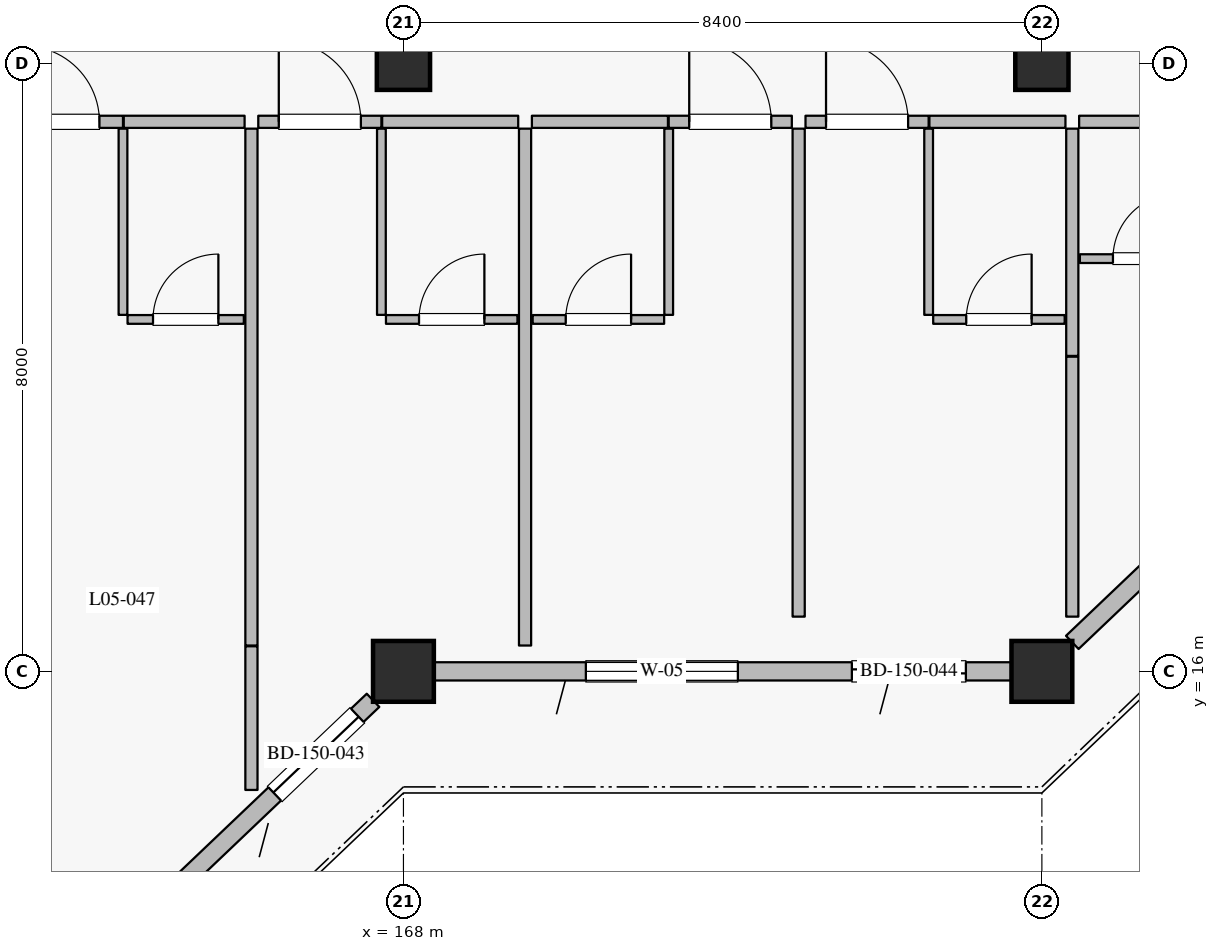
"""IFC4 building model, lengths in metres.
Left out: names, types, materials, properties, quantities, classifications, styles, units other than length and angle.
Written with IfcOpenShell. Run it as: python <this file> out.ifc"""

import sys

from ifc_helpers import new_model, si_unit, direction, frame, frame_2d, origin, origin_2d, place, context, subcontext, project, spatial, rectangle, extrude, element, fill, save


model = new_model("IFC4")
c1 = context("Model", 3, precision=1e-05, world=origin(), true_north=direction((0.0, 1.0)))
c2 = subcontext(c1, "Body", "Model", "MODEL_VIEW")
j1 = project(units=[si_unit("LENGTHUNIT", "METRE"), si_unit("PLANEANGLEUNIT", "RADIAN")], contexts=[c1])
p1 = place(None, origin())
s1 = spatial("IfcSite", under=j1, at=p1, CompositionType="ELEMENT")
p2 = place(p1, origin())
s2 = spatial("IfcBuilding", under=s1, at=p2, CompositionType="ELEMENT")
p3 = place(p2, frame((0.0, 0.0, 25.2)))
s3 = spatial("IfcBuildingStorey", under=s2, at=p3, CompositionType="ELEMENT", Elevation=25.2)
for number, where, z_axis, x_axis in (
    (1, (168.0, 16.0, 0.0), (0.0, 0.0, 1.0), (1.0, 0.0, 0.0)),
    (2, (176.4, 16.0, 0.0), (0.0, 0.0, 1.0), (1.0, 0.0, 0.0)),
):
    element("IfcColumn", number, at=place(p3, frame(where, z_axis=z_axis, x_axis=x_axis)), inside=s3, PredefinedType="COLUMN", context=c2, shape_type="SweptSolid", body=[
        extrude(rectangle(XDim=0.8, YDim=0.8, at=origin_2d()), origin(), (0.0, 0.0, 1.0), 3.6),
    ])
for number, where, z_axis, x_axis in (
    (3, (168.0, 24.0, 0.0), (0.0, 0.0, 1.0), (1.0, 0.0, 0.0)),
    (4, (176.4, 24.0, 0.0), (0.0, 0.0, 1.0), (1.0, 0.0, 0.0)),
):
    element("IfcColumn", number, at=place(p3, frame(where, z_axis=z_axis, x_axis=x_axis)), inside=s3, PredefinedType="COLUMN", context=c2, shape_type="SweptSolid", body=[
        extrude(rectangle(XDim=0.7, YDim=0.7, at=origin_2d()), origin(), (0.0, 0.0, 1.0), 3.6),
    ])
p4 = place(p3, frame((167.6, 15.619, 0.0), z_axis=(0.0, 0.0, 1.0), x_axis=(-0.724156739794, -0.689635422677, 0.0)))
e5 = element("IfcWall", 5, at=p4, inside=s3, PredefinedType="SOLIDWALL", context=c2, shape_type="SweptSolid", body=[
    extrude(rectangle(XDim=10.495, YDim=0.24, at=frame_2d((5.248, 0.0))), origin(), (0.0, 0.0, 1.0), 2.93),
])
p5 = place(p4, frame((0.286, 0.0, 0.0)))
e6 = element("IfcOpeningElement", 6, at=p5, cuts=e5, PredefinedType="OPENING", context=c2, shape_type="SweptSolid", body=[
    extrude(rectangle(XDim=1.5, YDim=2.25, at=frame_2d((0.75, 1.125))), frame((0.0, 0.13, 0.0), z_axis=(0.0, -1.0, 0.0), x_axis=(1.0, 0.0, 0.0)), (0.0, 0.0, 1.0), 0.26),
])
p6 = place(p4, frame((3.757, 0.0, 0.8)))
e7 = element("IfcOpeningElement", 7, at=p6, cuts=e5, PredefinedType="OPENING", context=c2, shape_type="SweptSolid", body=[
    extrude(rectangle(XDim=1.6, YDim=1.6, at=frame_2d((0.8, 0.8))), frame((0.0, 0.13, 0.0), z_axis=(0.0, -1.0, 0.0), x_axis=(1.0, 0.0, 0.0)), (0.0, 0.0, 1.0), 0.26),
])
p7 = place(p4, frame((7.969, 0.0, 0.8)))
e8 = element("IfcOpeningElement", 8, at=p7, cuts=e5, PredefinedType="OPENING", context=c2, shape_type="SweptSolid", body=[
    extrude(rectangle(XDim=1.6, YDim=1.6, at=frame_2d((0.8, 0.8))), frame((0.0, 0.13, 0.0), z_axis=(0.0, -1.0, 0.0), x_axis=(1.0, 0.0, 0.0)), (0.0, 0.0, 1.0), 0.26),
])
p8 = place(p3, frame((176.0, 16.0, 0.0), z_axis=(0.0, 0.0, 1.0), x_axis=(-1.0, 0.0, 0.0)))
e9 = element("IfcWall", 9, at=p8, inside=s3, PredefinedType="SOLIDWALL", context=c2, shape_type="SweptSolid", body=[
    extrude(rectangle(XDim=7.6, YDim=0.24, at=frame_2d((3.8, 0.0))), origin(), (0.0, 0.0, 1.0), 2.89),
])
p9 = place(p8, frame((0.6, 0.0, 0.0)))
e10 = element("IfcOpeningElement", 10, at=p9, cuts=e9, PredefinedType="OPENING", context=c2, shape_type="SweptSolid", body=[
    extrude(rectangle(XDim=1.5, YDim=2.25, at=frame_2d((0.75, 1.125))), frame((0.0, 0.13, 0.0), z_axis=(0.0, -1.0, 0.0), x_axis=(1.0, 0.0, 0.0)), (0.0, 0.0, 1.0), 0.26),
])
p10 = place(p8, frame((3.6, 0.0, 0.8)))
e11 = element("IfcOpeningElement", 11, at=p10, cuts=e9, PredefinedType="OPENING", context=c2, shape_type="SweptSolid", body=[
    extrude(rectangle(XDim=2.0, YDim=1.75, at=frame_2d((1.0, 0.875))), frame((0.0, 0.13, 0.0), z_axis=(0.0, -1.0, 0.0), x_axis=(1.0, 0.0, 0.0)), (0.0, 0.0, 1.0), 0.26),
])
p11 = place(p3, frame((184.4, 23.619, 0.0), z_axis=(0.0, 0.0, 1.0), x_axis=(-0.724145676014, -0.689647040094, 0.0)))
e12 = element("IfcWall", 12, at=p11, inside=s3, PredefinedType="SOLIDWALL", context=c2, shape_type="SweptSolid", body=[
    extrude(rectangle(XDim=10.495, YDim=0.24, at=frame_2d((5.248, 0.0))), origin(), (0.0, 0.0, 1.0), 2.89),
])
p12 = place(p11, frame((2.288, 0.0, 0.0)))
e13 = element("IfcOpeningElement", 13, at=p12, cuts=e12, PredefinedType="OPENING", context=c2, shape_type="SweptSolid", body=[
    extrude(rectangle(XDim=1.5, YDim=2.25, at=frame_2d((0.75, 1.125))), frame((0.0, 0.13, 0.0), z_axis=(0.0, -1.0, 0.0), x_axis=(1.0, 0.0, 0.0)), (0.0, 0.0, 1.0), 0.26),
])
p13 = place(p11, frame((7.009, 0.0, 0.8)))
e14 = element("IfcOpeningElement", 14, at=p13, cuts=e12, PredefinedType="OPENING", context=c2, shape_type="SweptSolid", body=[
    extrude(rectangle(XDim=2.0, YDim=1.75, at=frame_2d((1.0, 0.875))), frame((0.0, 0.13, 0.0), z_axis=(0.0, -1.0, 0.0), x_axis=(1.0, 0.0, 0.0)), (0.0, 0.0, 1.0), 0.26),
])
p14 = place(p3, frame((162.69, 23.23, 0.0), z_axis=(0.0, 0.0, 1.0), x_axis=(1.0, 0.0, 0.0)))
e15 = element("IfcWall", 15, at=p14, inside=s3, PredefinedType="PARTITIONING", context=c2, shape_type="SweptSolid", body=[
    extrude(rectangle(XDim=1.62, YDim=0.16, at=frame_2d((0.81, 0.0))), origin(), (0.0, 0.0, 1.0), 3.335),
])
p15 = place(p14, frame((0.31, 0.0, 0.0)))
e16 = element("IfcOpeningElement", 16, at=p15, cuts=e15, PredefinedType="OPENING", context=c2, shape_type="SweptSolid", body=[
    extrude(rectangle(XDim=1.0, YDim=2.25, at=frame_2d((0.5, 1.125))), frame((0.0, 0.09, 0.0), z_axis=(0.0, -1.0, 0.0), x_axis=(1.0, 0.0, 0.0)), (0.0, 0.0, 1.0), 0.18),
])
p16 = place(p3, frame((164.32, 23.23, 0.0), z_axis=(0.0, 0.0, 1.0), x_axis=(1.0, 0.0, 0.0)))
e17 = element("IfcWall", 17, at=p16, inside=s3, PredefinedType="PARTITIONING", context=c2, shape_type="SweptSolid", body=[
    extrude(rectangle(XDim=1.59, YDim=0.16, at=frame_2d((0.795, 0.0))), origin(), (0.0, 0.0, 1.0), 3.335),
])
p17 = place(p3, frame((164.31, 20.69, 0.0), z_axis=(0.0, 0.0, 1.0), x_axis=(0.0, 1.0, 0.0)))
e18 = element("IfcWall", 18, at=p17, inside=s3, PredefinedType="PARTITIONING", context=c2, shape_type="SweptSolid", body=[
    extrude(rectangle(XDim=2.45, YDim=0.115, at=frame_2d((1.225, 0.0))), origin(), (0.0, 0.0, 1.0), 3.335),
])
p18 = place(p3, frame((164.37, 20.63, 0.0), z_axis=(0.0, 0.0, 1.0), x_axis=(1.0, 0.0, 0.0)))
e19 = element("IfcWall", 19, at=p18, inside=s3, PredefinedType="PARTITIONING", context=c2, shape_type="SweptSolid", body=[
    extrude(rectangle(XDim=1.53, YDim=0.115, at=frame_2d((0.765, 0.0))), origin(), (0.0, 0.0, 1.0), 3.335),
])
p19 = place(p18, frame((0.335, 0.0, 0.0)))
e20 = element("IfcOpeningElement", 20, at=p19, cuts=e19, PredefinedType="OPENING", context=c2, shape_type="SweptSolid", body=[
    extrude(rectangle(XDim=0.86, YDim=2.12, at=frame_2d((0.43, 1.06))), frame((0.0, 0.067, 0.0), z_axis=(0.0, -1.0, 0.0), x_axis=(1.0, 0.0, 0.0)), (0.0, 0.0, 1.0), 0.135),
])
p20 = place(p3, frame((166.0, 14.44, 0.0), z_axis=(0.0, 0.0, 1.0), x_axis=(0.0, 1.0, 0.0)))
e21 = element("IfcWall", 21, at=p20, inside=s3, PredefinedType="PARTITIONING", context=c2, shape_type="SweptSolid", body=[
    extrude(rectangle(XDim=1.89, YDim=0.16, at=frame_2d((0.945, 0.0))), origin(), (0.0, 0.0, 1.0), 3.335),
])
p21 = place(p3, frame((166.09, 23.23, 0.0), z_axis=(0.0, 0.0, 1.0), x_axis=(1.0, 0.0, 0.0)))
e22 = element("IfcWall", 22, at=p21, inside=s3, PredefinedType="PARTITIONING", context=c2, shape_type="SweptSolid", body=[
    extrude(rectangle(XDim=1.62, YDim=0.16, at=frame_2d((0.81, 0.0))), origin(), (0.0, 0.0, 1.0), 3.335),
])
p22 = place(p21, frame((0.27, 0.0, 0.0)))
e23 = element("IfcOpeningElement", 23, at=p22, cuts=e22, PredefinedType="OPENING", context=c2, shape_type="SweptSolid", body=[
    extrude(rectangle(XDim=1.08, YDim=2.3, at=frame_2d((0.54, 1.15))), frame((0.0, 0.09, 0.0), z_axis=(0.0, -1.0, 0.0), x_axis=(1.0, 0.0, 0.0)), (0.0, 0.0, 1.0), 0.18),
])
p23 = place(p3, frame((167.72, 23.23, 0.0), z_axis=(0.0, 0.0, 1.0), x_axis=(1.0, 0.0, 0.0)))
e24 = element("IfcWall", 24, at=p23, inside=s3, PredefinedType="PARTITIONING", context=c2, shape_type="SweptSolid", body=[
    extrude(rectangle(XDim=1.79, YDim=0.16, at=frame_2d((0.895, 0.0))), origin(), (0.0, 0.0, 1.0), 3.335),
])
p24 = place(p3, frame((167.71, 20.69, 0.0), z_axis=(0.0, 0.0, 1.0), x_axis=(0.0, 1.0, 0.0)))
e25 = element("IfcWall", 25, at=p24, inside=s3, PredefinedType="PARTITIONING", context=c2, shape_type="SweptSolid", body=[
    extrude(rectangle(XDim=2.45, YDim=0.115, at=frame_2d((1.225, 0.0))), origin(), (0.0, 0.0, 1.0), 3.335),
])
p25 = place(p3, frame((167.77, 20.63, 0.0), z_axis=(0.0, 0.0, 1.0), x_axis=(1.0, 0.0, 0.0)))
e26 = element("IfcWall", 26, at=p25, inside=s3, PredefinedType="PARTITIONING", context=c2, shape_type="SweptSolid", body=[
    extrude(rectangle(XDim=1.73, YDim=0.115, at=frame_2d((0.865, 0.0))), origin(), (0.0, 0.0, 1.0), 3.335),
])
p26 = place(p25, frame((0.435, 0.0, 0.0)))
e27 = element("IfcOpeningElement", 27, at=p26, cuts=e26, PredefinedType="OPENING", context=c2, shape_type="SweptSolid", body=[
    extrude(rectangle(XDim=0.86, YDim=2.12, at=frame_2d((0.43, 1.06))), frame((0.0, 0.067, 0.0), z_axis=(0.0, -1.0, 0.0), x_axis=(1.0, 0.0, 0.0)), (0.0, 0.0, 1.0), 0.135),
])
p27 = place(p3, frame((166.0, 16.34, 0.0), z_axis=(0.0, 0.0, 1.0), x_axis=(0.0, 1.0, 0.0)))
e28 = element("IfcWall", 28, at=p27, inside=s3, PredefinedType="PARTITIONING", context=c2, shape_type="SweptSolid", body=[
    extrude(rectangle(XDim=6.8, YDim=0.16, at=frame_2d((3.4, 0.0))), origin(), (0.0, 0.0, 1.0), 3.335),
])
p28 = place(p3, frame((169.69, 23.23, 0.0), z_axis=(0.0, 0.0, 1.0), x_axis=(1.0, 0.0, 0.0)))
e29 = element("IfcWall", 29, at=p28, inside=s3, PredefinedType="PARTITIONING", context=c2, shape_type="SweptSolid", body=[
    extrude(rectangle(XDim=1.79, YDim=0.16, at=frame_2d((0.895, 0.0))), origin(), (0.0, 0.0, 1.0), 3.335),
])
p29 = place(p3, frame((171.49, 23.23, 0.0), z_axis=(0.0, 0.0, 1.0), x_axis=(1.0, 0.0, 0.0)))
e30 = element("IfcWall", 30, at=p29, inside=s3, PredefinedType="PARTITIONING", context=c2, shape_type="SweptSolid", body=[
    extrude(rectangle(XDim=1.62, YDim=0.16, at=frame_2d((0.81, 0.0))), origin(), (0.0, 0.0, 1.0), 3.335),
])
p30 = place(p29, frame((0.27, 0.0, 0.0)))
e31 = element("IfcOpeningElement", 31, at=p30, cuts=e30, PredefinedType="OPENING", context=c2, shape_type="SweptSolid", body=[
    extrude(rectangle(XDim=1.08, YDim=2.3, at=frame_2d((0.54, 1.15))), frame((0.0, 0.09, 0.0), z_axis=(0.0, -1.0, 0.0), x_axis=(1.0, 0.0, 0.0)), (0.0, 0.0, 1.0), 0.18),
])
p31 = place(p3, frame((171.49, 20.69, 0.0), z_axis=(0.0, 0.0, 1.0), x_axis=(0.0, 1.0, 0.0)))
e32 = element("IfcWall", 32, at=p31, inside=s3, PredefinedType="PARTITIONING", context=c2, shape_type="SweptSolid", body=[
    extrude(rectangle(XDim=2.45, YDim=0.115, at=frame_2d((1.225, 0.0))), origin(), (0.0, 0.0, 1.0), 3.335),
])
p32 = place(p3, frame((169.7, 20.63, 0.0), z_axis=(0.0, 0.0, 1.0), x_axis=(1.0, 0.0, 0.0)))
e33 = element("IfcWall", 33, at=p32, inside=s3, PredefinedType="PARTITIONING", context=c2, shape_type="SweptSolid", body=[
    extrude(rectangle(XDim=1.73, YDim=0.115, at=frame_2d((0.865, 0.0))), origin(), (0.0, 0.0, 1.0), 3.335),
])
p33 = place(p32, frame((0.435, 0.0, 0.0)))
e34 = element("IfcOpeningElement", 34, at=p33, cuts=e33, PredefinedType="OPENING", context=c2, shape_type="SweptSolid", body=[
    extrude(rectangle(XDim=0.86, YDim=2.12, at=frame_2d((0.43, 1.06))), frame((0.0, 0.067, 0.0), z_axis=(0.0, -1.0, 0.0), x_axis=(1.0, 0.0, 0.0)), (0.0, 0.0, 1.0), 0.135),
])
p34 = place(p3, frame((169.6, 16.34, 0.0), z_axis=(0.0, 0.0, 1.0), x_axis=(0.0, 1.0, 0.0)))
e35 = element("IfcWall", 35, at=p34, inside=s3, PredefinedType="PARTITIONING", context=c2, shape_type="SweptSolid", body=[
    extrude(rectangle(XDim=6.8, YDim=0.16, at=frame_2d((3.4, 0.0))), origin(), (0.0, 0.0, 1.0), 3.335),
])
p35 = place(p3, frame((173.29, 23.23, 0.0), z_axis=(0.0, 0.0, 1.0), x_axis=(1.0, 0.0, 0.0)))
e36 = element("IfcWall", 36, at=p35, inside=s3, PredefinedType="PARTITIONING", context=c2, shape_type="SweptSolid", body=[
    extrude(rectangle(XDim=1.62, YDim=0.16, at=frame_2d((0.81, 0.0))), origin(), (0.0, 0.0, 1.0), 3.335),
])
p36 = place(p35, frame((0.27, 0.0, 0.0)))
e37 = element("IfcOpeningElement", 37, at=p36, cuts=e36, PredefinedType="OPENING", context=c2, shape_type="SweptSolid", body=[
    extrude(rectangle(XDim=1.08, YDim=2.3, at=frame_2d((0.54, 1.15))), frame((0.0, 0.09, 0.0), z_axis=(0.0, -1.0, 0.0), x_axis=(1.0, 0.0, 0.0)), (0.0, 0.0, 1.0), 0.18),
])
p37 = place(p3, frame((174.92, 23.23, 0.0), z_axis=(0.0, 0.0, 1.0), x_axis=(1.0, 0.0, 0.0)))
e38 = element("IfcWall", 38, at=p37, inside=s3, PredefinedType="PARTITIONING", context=c2, shape_type="SweptSolid", body=[
    extrude(rectangle(XDim=1.79, YDim=0.16, at=frame_2d((0.895, 0.0))), origin(), (0.0, 0.0, 1.0), 3.335),
])
p38 = place(p3, frame((174.91, 20.69, 0.0), z_axis=(0.0, 0.0, 1.0), x_axis=(0.0, 1.0, 0.0)))
e39 = element("IfcWall", 39, at=p38, inside=s3, PredefinedType="PARTITIONING", context=c2, shape_type="SweptSolid", body=[
    extrude(rectangle(XDim=2.45, YDim=0.115, at=frame_2d((1.225, 0.0))), origin(), (0.0, 0.0, 1.0), 3.335),
])
p39 = place(p3, frame((174.97, 20.63, 0.0), z_axis=(0.0, 0.0, 1.0), x_axis=(1.0, 0.0, 0.0)))
e40 = element("IfcWall", 40, at=p39, inside=s3, PredefinedType="PARTITIONING", context=c2, shape_type="SweptSolid", body=[
    extrude(rectangle(XDim=1.73, YDim=0.115, at=frame_2d((0.865, 0.0))), origin(), (0.0, 0.0, 1.0), 3.335),
])
p40 = place(p39, frame((0.435, 0.0, 0.0)))
e41 = element("IfcOpeningElement", 41, at=p40, cuts=e40, PredefinedType="OPENING", context=c2, shape_type="SweptSolid", body=[
    extrude(rectangle(XDim=0.86, YDim=2.12, at=frame_2d((0.43, 1.06))), frame((0.0, 0.067, 0.0), z_axis=(0.0, -1.0, 0.0), x_axis=(1.0, 0.0, 0.0)), (0.0, 0.0, 1.0), 0.135),
])
p41 = place(p3, frame((173.2, 16.72, 0.0), z_axis=(0.0, 0.0, 1.0), x_axis=(0.0, 1.0, 0.0)))
e42 = element("IfcWall", 42, at=p41, inside=s3, PredefinedType="PARTITIONING", context=c2, shape_type="SweptSolid", body=[
    extrude(rectangle(XDim=6.42, YDim=0.16, at=frame_2d((3.21, 0.0))), origin(), (0.0, 0.0, 1.0), 3.335),
])
p42 = place(p3, frame((176.8, 16.72, 0.0), z_axis=(0.0, 0.0, 1.0), x_axis=(0.0, 1.0, 0.0)))
e43 = element("IfcWall", 43, at=p42, inside=s3, PredefinedType="PARTITIONING", context=c2, shape_type="SweptSolid", body=[
    extrude(rectangle(XDim=3.42, YDim=0.16, at=frame_2d((1.71, 0.0))), origin(), (0.0, 0.0, 1.0), 3.335),
])
p43 = place(p3, frame((176.89, 23.23, 0.0), z_axis=(0.0, 0.0, 1.0), x_axis=(1.0, 0.0, 0.0)))
e44 = element("IfcWall", 44, at=p43, inside=s3, PredefinedType="PARTITIONING", context=c2, shape_type="SweptSolid", body=[
    extrude(rectangle(XDim=1.79, YDim=0.16, at=frame_2d((0.895, 0.0))), origin(), (0.0, 0.0, 1.0), 3.335),
])
p44 = place(p3, frame((176.9, 21.43, 0.0), z_axis=(0.0, 0.0, 1.0), x_axis=(1.0, 0.0, 0.0)))
e45 = element("IfcWall", 45, at=p44, inside=s3, PredefinedType="PARTITIONING", context=c2, shape_type="SweptSolid", body=[
    extrude(rectangle(XDim=1.73, YDim=0.115, at=frame_2d((0.865, 0.0))), origin(), (0.0, 0.0, 1.0), 3.335),
])
p45 = place(p44, frame((0.435, 0.0, 0.0)))
e46 = element("IfcOpeningElement", 46, at=p45, cuts=e45, PredefinedType="OPENING", context=c2, shape_type="SweptSolid", body=[
    extrude(rectangle(XDim=0.86, YDim=2.12, at=frame_2d((0.43, 1.06))), frame((0.0, 0.067, 0.0), z_axis=(0.0, -1.0, 0.0), x_axis=(1.0, 0.0, 0.0)), (0.0, 0.0, 1.0), 0.135),
])
p46 = place(p3, frame((176.8, 20.15, 0.0), z_axis=(0.0, 0.0, 1.0), x_axis=(0.0, 1.0, 0.0)))
e47 = element("IfcWall", 47, at=p46, inside=s3, PredefinedType="PARTITIONING", context=c2, shape_type="SweptSolid", body=[
    extrude(rectangle(XDim=2.99, YDim=0.16, at=frame_2d((1.495, 0.0))), origin(), (0.0, 0.0, 1.0), 3.335),
])
p47 = place(p5, origin())
e48 = element("IfcDoor", 48, at=p47, inside=s3, OperationType="SLIDING_TO_LEFT", PredefinedType="DOOR", context=c2, shape_type="SweptSolid", body=[
    extrude(rectangle(XDim=1.5, YDim=2.25, at=frame_2d((0.75, 1.125))), frame((0.0, 0.025, 0.0), z_axis=(0.0, -1.0, 0.0), x_axis=(1.0, 0.0, 0.0)), (0.0, 0.0, 1.0), 0.05),
])
fill(e6, e48)
p48 = place(p9, origin())
e49 = element("IfcDoor", 49, at=p48, inside=s3, OperationType="SLIDING_TO_LEFT", PredefinedType="DOOR", context=c2, shape_type="SweptSolid", body=[
    extrude(rectangle(XDim=1.5, YDim=2.25, at=frame_2d((0.75, 1.125))), frame((0.0, 0.025, 0.0), z_axis=(0.0, -1.0, 0.0), x_axis=(1.0, 0.0, 0.0)), (0.0, 0.0, 1.0), 0.05),
])
fill(e10, e49)
p49 = place(p10, origin())
e50 = element("IfcWindow", 50, at=p49, inside=s3, PartitioningType="DOUBLE_PANEL_VERTICAL", PredefinedType="WINDOW", context=c2, shape_type="SweptSolid", body=[
    extrude(rectangle(XDim=2.0, YDim=1.75, at=frame_2d((1.0, 0.875))), frame((0.0, 0.03, 0.0), z_axis=(0.0, -1.0, 0.0), x_axis=(1.0, 0.0, 0.0)), (0.0, 0.0, 1.0), 0.06),
])
fill(e11, e50)
p50 = place(p15, origin())
e51 = element("IfcDoor", 51, at=p50, inside=s3, OperationType="SINGLE_SWING_LEFT", PredefinedType="DOOR", context=c2, shape_type="SweptSolid", body=[
    extrude(rectangle(XDim=1.0, YDim=2.25, at=frame_2d((0.5, 1.125))), frame((0.0, 0.025, 0.0), z_axis=(0.0, -1.0, 0.0), x_axis=(1.0, 0.0, 0.0)), (0.0, 0.0, 1.0), 0.05),
])
fill(e16, e51)
p51 = place(p19, origin())
e52 = element("IfcDoor", 52, at=p51, inside=s3, OperationType="SINGLE_SWING_RIGHT", PredefinedType="DOOR", context=c2, shape_type="SweptSolid", body=[
    extrude(rectangle(XDim=0.86, YDim=2.12, at=frame_2d((0.43, 1.06))), frame((0.0, 0.025, 0.0), z_axis=(0.0, -1.0, 0.0), x_axis=(1.0, 0.0, 0.0)), (0.0, 0.0, 1.0), 0.05),
])
fill(e20, e52)
p52 = place(p22, origin())
e53 = element("IfcDoor", 53, at=p52, inside=s3, OperationType="SINGLE_SWING_LEFT", PredefinedType="DOOR", context=c2, shape_type="SweptSolid", body=[
    extrude(rectangle(XDim=1.08, YDim=2.3, at=frame_2d((0.54, 1.15))), frame((0.0, 0.025, 0.0), z_axis=(0.0, -1.0, 0.0), x_axis=(1.0, 0.0, 0.0)), (0.0, 0.0, 1.0), 0.05),
])
fill(e23, e53)
p53 = place(p26, origin())
e54 = element("IfcDoor", 54, at=p53, inside=s3, OperationType="SINGLE_SWING_RIGHT", PredefinedType="DOOR", context=c2, shape_type="SweptSolid", body=[
    extrude(rectangle(XDim=0.86, YDim=2.12, at=frame_2d((0.43, 1.06))), frame((0.0, 0.025, 0.0), z_axis=(0.0, -1.0, 0.0), x_axis=(1.0, 0.0, 0.0)), (0.0, 0.0, 1.0), 0.05),
])
fill(e27, e54)
p54 = place(p30, origin())
e55 = element("IfcDoor", 55, at=p54, inside=s3, OperationType="SINGLE_SWING_LEFT", PredefinedType="DOOR", context=c2, shape_type="SweptSolid", body=[
    extrude(rectangle(XDim=1.08, YDim=2.3, at=frame_2d((0.54, 1.15))), frame((0.0, 0.025, 0.0), z_axis=(0.0, -1.0, 0.0), x_axis=(1.0, 0.0, 0.0)), (0.0, 0.0, 1.0), 0.05),
])
fill(e31, e55)
p55 = place(p33, origin())
e56 = element("IfcDoor", 56, at=p55, inside=s3, OperationType="SINGLE_SWING_RIGHT", PredefinedType="DOOR", context=c2, shape_type="SweptSolid", body=[
    extrude(rectangle(XDim=0.86, YDim=2.12, at=frame_2d((0.43, 1.06))), frame((0.0, 0.025, 0.0), z_axis=(0.0, -1.0, 0.0), x_axis=(1.0, 0.0, 0.0)), (0.0, 0.0, 1.0), 0.05),
])
fill(e34, e56)
p56 = place(p36, origin())
e57 = element("IfcDoor", 57, at=p56, inside=s3, OperationType="SINGLE_SWING_LEFT", PredefinedType="DOOR", context=c2, shape_type="SweptSolid", body=[
    extrude(rectangle(XDim=1.08, YDim=2.3, at=frame_2d((0.54, 1.15))), frame((0.0, 0.025, 0.0), z_axis=(0.0, -1.0, 0.0), x_axis=(1.0, 0.0, 0.0)), (0.0, 0.0, 1.0), 0.05),
])
fill(e37, e57)
p57 = place(p40, origin())
e58 = element("IfcDoor", 58, at=p57, inside=s3, OperationType="SINGLE_SWING_RIGHT", PredefinedType="DOOR", context=c2, shape_type="SweptSolid", body=[
    extrude(rectangle(XDim=0.86, YDim=2.12, at=frame_2d((0.43, 1.06))), frame((0.0, 0.025, 0.0), z_axis=(0.0, -1.0, 0.0), x_axis=(1.0, 0.0, 0.0)), (0.0, 0.0, 1.0), 0.05),
])
fill(e41, e58)
p58 = place(p45, origin())
e59 = element("IfcDoor", 59, at=p58, inside=s3, OperationType="SINGLE_SWING_RIGHT", PredefinedType="DOOR", context=c2, shape_type="SweptSolid", body=[
    extrude(rectangle(XDim=0.86, YDim=2.12, at=frame_2d((0.43, 1.06))), frame((0.0, 0.025, 0.0), z_axis=(0.0, -1.0, 0.0), x_axis=(1.0, 0.0, 0.0)), (0.0, 0.0, 1.0), 0.05),
])
fill(e46, e59)
save(model, sys.argv[1])
